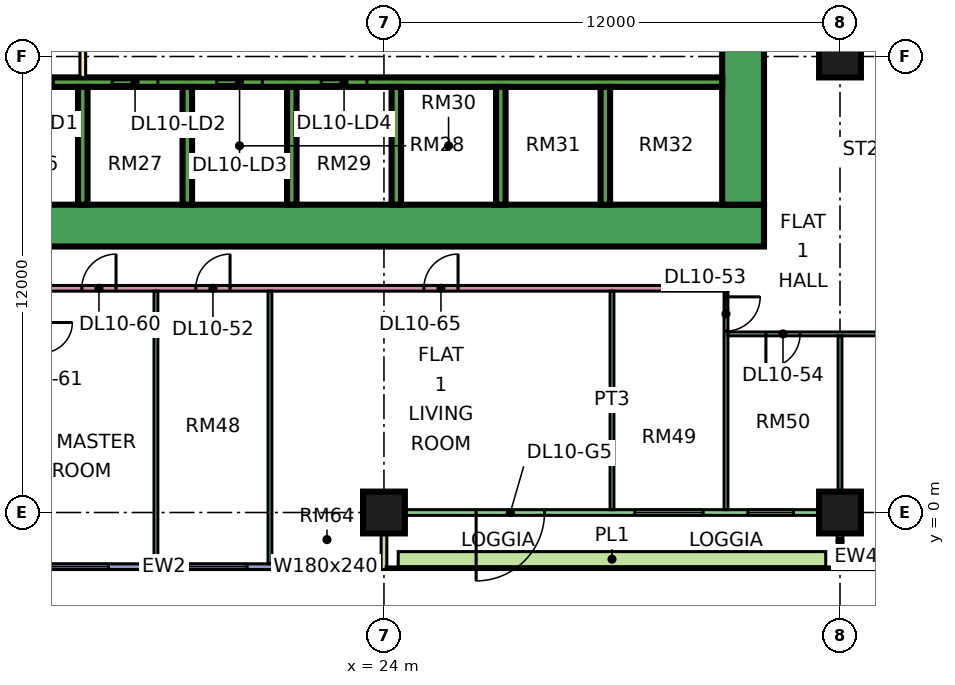
"""IFC4 building model, lengths in metres.
Left out: names, types, materials, properties, quantities, classifications, styles, units other than length and angle.
Written with IfcOpenShell. Run it as: python <this file> out.ifc"""

import sys

from ifc_helpers import new_model, si_unit, direction, frame, frame_2d, origin, origin_2d, place, context, subcontext, project, spatial, rectangle, extrude, element, fill, save


model = new_model("IFC4")
c1 = context("Model", 3, precision=1e-05, world=origin(), true_north=direction((0.0, 1.0)))
c2 = subcontext(c1, "Body", "Model", "MODEL_VIEW")
j1 = project(units=[si_unit("LENGTHUNIT", "METRE"), si_unit("PLANEANGLEUNIT", "RADIAN")], contexts=[c1])
p1 = place(None, origin())
s1 = spatial("IfcSite", under=j1, at=p1, CompositionType="ELEMENT")
p2 = place(p1, origin())
s2 = spatial("IfcBuilding", under=s1, at=p2, CompositionType="ELEMENT")
p3 = place(p2, frame((0.0, 0.0, 52.65)))
s3 = spatial("IfcBuildingStorey", under=s2, at=p3, CompositionType="ELEMENT", Elevation=52.65)
for number, where, z_axis, x_axis in (
    (1, (24.0, 0.0, 0.0), (0.0, 0.0, 1.0), (1.0, 0.0, 0.0)),
    (2, (36.0, 0.0, 0.0), (0.0, 0.0, 1.0), (1.0, 0.0, 0.0)),
    (3, (36.0, 12.0, 0.0), (0.0, 0.0, 1.0), (1.0, 0.0, 0.0)),
):
    element("IfcColumn", number, at=place(p3, frame(where, z_axis=z_axis, x_axis=x_axis)), inside=s3, PredefinedType="COLUMN", context=c2, shape_type="SweptSolid", body=[
        extrude(rectangle(XDim=1.1, YDim=1.1, at=origin_2d()), origin(), (0.0, 0.0, 1.0), 3.75),
    ])
p4 = place(p3, frame((9.0, 7.55, 0.0), z_axis=(0.0, 0.0, 1.0), x_axis=(1.0, 0.0, 0.0)))
e4 = element("IfcWall", 4, at=p4, inside=s3, PredefinedType="SHEAR", context=c2, shape_type="SweptSolid", body=[
    extrude(rectangle(XDim=25.0, YDim=1.1, at=frame_2d((12.5, 0.0))), origin(), (0.0, 0.0, 1.0), 3.75),
])
p5 = place(p3, frame((33.45, 8.1, 0.0), z_axis=(0.0, 0.0, 1.0), x_axis=(0.0, 1.0, 0.0)))
e5 = element("IfcWall", 5, at=p5, inside=s3, PredefinedType="SHEAR", context=c2, shape_type="SweptSolid", body=[
    extrude(rectangle(XDim=10.8, YDim=1.1, at=frame_2d((5.4, 0.0))), origin(), (0.0, 0.0, 1.0), 3.75),
])
p6 = place(p5, frame((5.1, 0.0, 0.0)))
e6 = element("IfcOpeningElement", 6, at=p6, cuts=e5, PredefinedType="OPENING", context=c2, shape_type="SweptSolid", body=[
    extrude(rectangle(XDim=1.8, YDim=2.4, at=frame_2d((0.9, 1.2))), frame((0.0, 0.56, 0.0), z_axis=(0.0, -1.0, 0.0), x_axis=(1.0, 0.0, 0.0)), (0.0, 0.0, 1.0), 1.12),
])
p7 = place(p3, frame((13.45, 11.325, 0.0), z_axis=(0.0, 0.0, 1.0), x_axis=(1.0, 0.0, 0.0)))
e7 = element("IfcWall", 7, at=p7, inside=s3, PredefinedType="SHEAR", context=c2, shape_type="SweptSolid", body=[
    extrude(rectangle(XDim=19.45, YDim=0.25, at=frame_2d((9.725, 0.0))), origin(), (0.0, 0.0, 1.0), 3.75),
])
p8 = place(p7, frame((0.65, 0.0, 0.0)))
e8 = element("IfcOpeningElement", 8, at=p8, cuts=e7, PredefinedType="OPENING", context=c2, shape_type="SweptSolid", body=[
    extrude(rectangle(XDim=1.2, YDim=2.2, at=frame_2d((0.6, 1.1))), frame((0.0, 0.135, 0.0), z_axis=(0.0, -1.0, 0.0), x_axis=(1.0, 0.0, 0.0)), (0.0, 0.0, 1.0), 0.27),
])
p9 = place(p7, frame((3.4, 0.0, 0.0)))
e9 = element("IfcOpeningElement", 9, at=p9, cuts=e7, PredefinedType="OPENING", context=c2, shape_type="SweptSolid", body=[
    extrude(rectangle(XDim=1.2, YDim=2.2, at=frame_2d((0.6, 1.1))), frame((0.0, 0.135, 0.0), z_axis=(0.0, -1.0, 0.0), x_axis=(1.0, 0.0, 0.0)), (0.0, 0.0, 1.0), 0.27),
])
p10 = place(p7, frame((6.15, 0.0, 0.0)))
e10 = element("IfcOpeningElement", 10, at=p10, cuts=e7, PredefinedType="OPENING", context=c2, shape_type="SweptSolid", body=[
    extrude(rectangle(XDim=1.2, YDim=2.2, at=frame_2d((0.6, 1.1))), frame((0.0, 0.135, 0.0), z_axis=(0.0, -1.0, 0.0), x_axis=(1.0, 0.0, 0.0)), (0.0, 0.0, 1.0), 0.27),
])
p11 = place(p7, frame((8.9, 0.0, 0.0)))
e11 = element("IfcOpeningElement", 11, at=p11, cuts=e7, PredefinedType="OPENING", context=c2, shape_type="SweptSolid", body=[
    extrude(rectangle(XDim=1.2, YDim=2.2, at=frame_2d((0.6, 1.1))), frame((0.0, 0.135, 0.0), z_axis=(0.0, -1.0, 0.0), x_axis=(1.0, 0.0, 0.0)), (0.0, 0.0, 1.0), 0.27),
])
for number, where, z_axis, x_axis in (
    (12, (16.075, 8.1, 0.0), (0.0, 0.0, 1.0), (0.0, 1.0, 0.0)),
    (13, (18.825, 8.1, 0.0), (0.0, 0.0, 1.0), (0.0, 1.0, 0.0)),
    (14, (21.575, 8.1, 0.0), (0.0, 0.0, 1.0), (0.0, 1.0, 0.0)),
    (15, (24.325, 8.1, 0.0), (0.0, 0.0, 1.0), (0.0, 1.0, 0.0)),
    (16, (27.075, 8.1, 0.0), (0.0, 0.0, 1.0), (0.0, 1.0, 0.0)),
    (17, (29.825, 8.1, 0.0), (0.0, 0.0, 1.0), (0.0, 1.0, 0.0)),
):
    element("IfcWall", number, at=place(p3, frame(where, z_axis=z_axis, x_axis=x_axis)), inside=s3, PredefinedType="SHEAR", context=c2, shape_type="SweptSolid", body=[
        extrude(rectangle(XDim=3.1, YDim=0.25, at=frame_2d((1.55, 0.0))), origin(), (0.0, 0.0, 1.0), 3.75),
    ])
p12 = place(p3, frame((12.5, -1.425, 0.0), z_axis=(0.0, 0.0, 1.0), x_axis=(1.0, 0.0, 0.0)))
e18 = element("IfcWall", 18, at=p12, inside=s3, PredefinedType="SOLIDWALL", context=c2, shape_type="SweptSolid", body=[
    extrude(rectangle(XDim=11.425, YDim=0.15, at=frame_2d((5.712, 0.0))), origin(), (0.0, 0.0, 1.0), 3.35),
])
p13 = place(p12, frame((1.25, 0.0, 0.45)))
e19 = element("IfcOpeningElement", 19, at=p13, cuts=e18, PredefinedType="OPENING", context=c2, shape_type="SweptSolid", body=[
    extrude(rectangle(XDim=3.0, YDim=2.4, at=frame_2d((1.5, 1.2))), frame((0.0, 0.085, 0.0), z_axis=(0.0, -1.0, 0.0), x_axis=(1.0, 0.0, 0.0)), (0.0, 0.0, 1.0), 0.17),
])
p14 = place(p12, frame((6.1, 0.0, 0.45)))
e20 = element("IfcOpeningElement", 20, at=p14, cuts=e18, PredefinedType="OPENING", context=c2, shape_type="SweptSolid", body=[
    extrude(rectangle(XDim=1.8, YDim=2.4, at=frame_2d((0.9, 1.2))), frame((0.0, 0.085, 0.0), z_axis=(0.0, -1.0, 0.0), x_axis=(1.0, 0.0, 0.0)), (0.0, 0.0, 1.0), 0.17),
])
p15 = place(p12, frame((9.062, 0.0, 0.45)))
e21 = element("IfcOpeningElement", 21, at=p15, cuts=e18, PredefinedType="OPENING", context=c2, shape_type="SweptSolid", body=[
    extrude(rectangle(XDim=1.8, YDim=2.4, at=frame_2d((0.9, 1.2))), frame((0.0, 0.085, 0.0), z_axis=(0.0, -1.0, 0.0), x_axis=(1.0, 0.0, 0.0)), (0.0, 0.0, 1.0), 0.17),
])
p16 = place(p3, frame((24.075, 0.0, 0.0), z_axis=(0.0, 0.0, 1.0), x_axis=(1.0, 0.0, 0.0)))
e22 = element("IfcWall", 22, at=p16, inside=s3, PredefinedType="SOLIDWALL", context=c2, shape_type="SweptSolid", body=[
    extrude(rectangle(XDim=11.85, YDim=0.15, at=frame_2d((5.925, 0.0))), origin(), (0.0, 0.0, 1.0), 3.35),
])
p17 = place(p16, frame((2.35, 0.0, 0.0)))
e23 = element("IfcOpeningElement", 23, at=p17, cuts=e22, PredefinedType="OPENING", context=c2, shape_type="SweptSolid", body=[
    extrude(rectangle(XDim=1.8, YDim=2.4, at=frame_2d((0.9, 1.2))), frame((0.0, 0.085, 0.0), z_axis=(0.0, -1.0, 0.0), x_axis=(1.0, 0.0, 0.0)), (0.0, 0.0, 1.0), 0.17),
])
p18 = place(p16, frame((6.525, 0.0, 0.45)))
e24 = element("IfcOpeningElement", 24, at=p18, cuts=e22, PredefinedType="OPENING", context=c2, shape_type="SweptSolid", body=[
    extrude(rectangle(XDim=1.8, YDim=2.4, at=frame_2d((0.9, 1.2))), frame((0.0, 0.085, 0.0), z_axis=(0.0, -1.0, 0.0), x_axis=(1.0, 0.0, 0.0)), (0.0, 0.0, 1.0), 0.17),
])
p19 = place(p16, frame((9.5, 0.0, 0.45)))
e25 = element("IfcOpeningElement", 25, at=p19, cuts=e22, PredefinedType="OPENING", context=c2, shape_type="SweptSolid", body=[
    extrude(rectangle(XDim=1.2, YDim=2.4, at=frame_2d((0.6, 1.2))), frame((0.0, 0.085, 0.0), z_axis=(0.0, -1.0, 0.0), x_axis=(1.0, 0.0, 0.0)), (0.0, 0.0, 1.0), 0.17),
])
for number, where, z_axis, x_axis in (
    (26, (24.0, -1.5, 0.0), (0.0, 0.0, 1.0), (0.0, 1.0, 0.0)),
    (27, (36.0, -1.5, 0.0), (0.0, 0.0, 1.0), (0.0, 1.0, 0.0)),
):
    element("IfcWall", number, at=place(p3, frame(where, z_axis=z_axis, x_axis=x_axis)), inside=s3, PredefinedType="SOLIDWALL", context=c2, shape_type="SweptSolid", body=[
        extrude(rectangle(XDim=1.5, YDim=0.15, at=frame_2d((0.75, 0.0))), origin(), (0.0, 0.0, 1.0), 3.35),
    ])
p20 = place(p3, frame((36.075, -1.425, 0.0), z_axis=(0.0, 0.0, 1.0), x_axis=(1.0, 0.0, 0.0)))
e28 = element("IfcWall", 28, at=p20, inside=s3, PredefinedType="SOLIDWALL", context=c2, shape_type="SweptSolid", body=[
    extrude(rectangle(XDim=11.85, YDim=0.15, at=frame_2d((5.925, 0.0))), origin(), (0.0, 0.0, 1.0), 3.35),
])
p21 = place(p20, frame((2.962, 0.0, 0.45)))
e29 = element("IfcOpeningElement", 29, at=p21, cuts=e28, PredefinedType="OPENING", context=c2, shape_type="SweptSolid", body=[
    extrude(rectangle(XDim=3.0, YDim=2.4, at=frame_2d((1.5, 1.2))), frame((0.0, 0.085, 0.0), z_axis=(0.0, -1.0, 0.0), x_axis=(1.0, 0.0, 0.0)), (0.0, 0.0, 1.0), 0.17),
])
p22 = place(p20, frame((9.488, 0.0, 0.45)))
e30 = element("IfcOpeningElement", 30, at=p22, cuts=e28, PredefinedType="OPENING", context=c2, shape_type="SweptSolid", body=[
    extrude(rectangle(XDim=1.8, YDim=2.4, at=frame_2d((0.9, 1.2))), frame((0.0, 0.085, 0.0), z_axis=(0.0, -1.0, 0.0), x_axis=(1.0, 0.0, 0.0)), (0.0, 0.0, 1.0), 0.17),
])
p23 = place(p3, frame((24.375, -1.229, 0.0), z_axis=(0.0, 0.0, 1.0), x_axis=(1.0, 0.0, 0.0)))
e31 = element("IfcWall", 31, at=p23, inside=s3, PredefinedType="SOLIDWALL", context=c2, shape_type="SweptSolid", body=[
    extrude(rectangle(XDim=11.25, YDim=0.4, at=frame_2d((5.625, 0.0))), origin(), (0.0, 0.0, 1.0), 0.7),
])
p24 = place(p3, frame((16.075, 11.45, 0.0), z_axis=(0.0, 0.0, 1.0), x_axis=(0.0, 1.0, 0.0)))
e32 = element("IfcWall", 32, at=p24, inside=s3, PredefinedType="PARTITIONING", context=c2, shape_type="SweptSolid", body=[
    extrude(rectangle(XDim=4.1, YDim=0.15, at=frame_2d((2.05, 0.0))), origin(), (0.0, 0.0, 1.0), 3.35),
])
p25 = place(p24, frame((1.15, 0.0, 0.0)))
e33 = element("IfcOpeningElement", 33, at=p25, cuts=e32, PredefinedType="OPENING", context=c2, shape_type="SweptSolid", body=[
    extrude(rectangle(XDim=1.8, YDim=2.4, at=frame_2d((0.9, 1.2))), frame((0.0, 0.085, 0.0), z_axis=(0.0, -1.0, 0.0), x_axis=(1.0, 0.0, 0.0)), (0.0, 0.0, 1.0), 0.17),
])
p26 = place(p3, frame((11.925, 5.9, 0.0), z_axis=(0.0, 0.0, 1.0), x_axis=(1.0, 0.0, 0.0)))
e34 = element("IfcWall", 34, at=p26, inside=s3, PredefinedType="PARTITIONING", context=c2, shape_type="SweptSolid", body=[
    extrude(rectangle(XDim=21.125, YDim=0.15, at=frame_2d((10.562, 0.0))), origin(), (0.0, 0.0, 1.0), 3.35),
])
p27 = place(p26, frame((7.125, 0.0, 0.0)))
e35 = element("IfcOpeningElement", 35, at=p27, cuts=e34, PredefinedType="OPENING", context=c2, shape_type="SweptSolid", body=[
    extrude(rectangle(XDim=0.9, YDim=2.1, at=frame_2d((0.45, 1.05))), frame((0.0, 0.085, 0.0), z_axis=(0.0, -1.0, 0.0), x_axis=(1.0, 0.0, 0.0)), (0.0, 0.0, 1.0), 0.17),
])
p28 = place(p26, frame((4.125, 0.0, 0.0)))
e36 = element("IfcOpeningElement", 36, at=p28, cuts=e34, PredefinedType="OPENING", context=c2, shape_type="SweptSolid", body=[
    extrude(rectangle(XDim=0.9, YDim=2.1, at=frame_2d((0.45, 1.05))), frame((0.0, 0.085, 0.0), z_axis=(0.0, -1.0, 0.0), x_axis=(1.0, 0.0, 0.0)), (0.0, 0.0, 1.0), 0.17),
])
p29 = place(p26, frame((13.125, 0.0, 0.0)))
e37 = element("IfcOpeningElement", 37, at=p29, cuts=e34, PredefinedType="OPENING", context=c2, shape_type="SweptSolid", body=[
    extrude(rectangle(XDim=0.9, YDim=2.1, at=frame_2d((0.45, 1.05))), frame((0.0, 0.085, 0.0), z_axis=(0.0, -1.0, 0.0), x_axis=(1.0, 0.0, 0.0)), (0.0, 0.0, 1.0), 0.17),
])
p30 = place(p3, frame((18.0, -1.351, 0.0), z_axis=(0.0, 0.0, 1.0), x_axis=(0.0, 1.0, 0.0)))
e38 = element("IfcWall", 38, at=p30, inside=s3, PredefinedType="PARTITIONING", context=c2, shape_type="SweptSolid", body=[
    extrude(rectangle(XDim=7.176, YDim=0.1, at=frame_2d((3.588, 0.0))), origin(), (0.0, 0.0, 1.0), 3.35),
])
p31 = place(p3, frame((21.0, -1.35, 0.0), z_axis=(0.0, 0.0, 1.0), x_axis=(0.0, 1.0, 0.0)))
e39 = element("IfcWall", 39, at=p31, inside=s3, PredefinedType="PARTITIONING", context=c2, shape_type="SweptSolid", body=[
    extrude(rectangle(XDim=7.175, YDim=0.1, at=frame_2d((3.587, 0.0))), origin(), (0.0, 0.0, 1.0), 3.35),
])
p32 = place(p3, frame((30.0, 0.074, 0.0), z_axis=(0.0, 0.0, 1.0), x_axis=(0.0, 1.0, 0.0)))
e40 = element("IfcWall", 40, at=p32, inside=s3, PredefinedType="PARTITIONING", context=c2, shape_type="SweptSolid", body=[
    extrude(rectangle(XDim=5.751, YDim=0.1, at=frame_2d((2.875, 0.0))), origin(), (0.0, 0.0, 1.0), 3.35),
])
p33 = place(p3, frame((33.0, 0.074, 0.0), z_axis=(0.0, 0.0, 1.0), x_axis=(0.0, 1.0, 0.0)))
e41 = element("IfcWall", 41, at=p33, inside=s3, PredefinedType="PARTITIONING", context=c2, shape_type="SweptSolid", body=[
    extrude(rectangle(XDim=5.751, YDim=0.1, at=frame_2d((2.875, 0.0))), origin(), (0.0, 0.0, 1.0), 3.35),
])
p34 = place(p33, frame((4.701, 0.0, 0.0)))
e42 = element("IfcOpeningElement", 42, at=p34, cuts=e41, PredefinedType="OPENING", context=c2, shape_type="SweptSolid", body=[
    extrude(rectangle(XDim=0.9, YDim=2.1, at=frame_2d((0.45, 1.05))), frame((0.0, 0.06, 0.0), z_axis=(0.0, -1.0, 0.0), x_axis=(1.0, 0.0, 0.0)), (0.0, 0.0, 1.0), 0.12),
])
p35 = place(p3, frame((33.05, 4.7, 0.0), z_axis=(0.0, 0.0, 1.0), x_axis=(1.0, 0.0, 0.0)))
e43 = element("IfcWall", 43, at=p35, inside=s3, PredefinedType="PARTITIONING", context=c2, shape_type="SweptSolid", body=[
    extrude(rectangle(XDim=20.85, YDim=0.1, at=frame_2d((10.425, 0.0))), origin(), (0.0, 0.0, 1.0), 3.35),
])
p36 = place(p35, frame((1.0, 0.0, 0.0)))
e44 = element("IfcOpeningElement", 44, at=p36, cuts=e43, PredefinedType="OPENING", context=c2, shape_type="SweptSolid", body=[
    extrude(rectangle(XDim=0.9, YDim=2.1, at=frame_2d((0.45, 1.05))), frame((0.0, 0.06, 0.0), z_axis=(0.0, -1.0, 0.0), x_axis=(1.0, 0.0, 0.0)), (0.0, 0.0, 1.0), 0.12),
])
p37 = place(p35, frame((13.0, 0.0, 0.0)))
e45 = element("IfcOpeningElement", 45, at=p37, cuts=e43, PredefinedType="OPENING", context=c2, shape_type="SweptSolid", body=[
    extrude(rectangle(XDim=0.9, YDim=2.1, at=frame_2d((0.45, 1.05))), frame((0.0, 0.06, 0.0), z_axis=(0.0, -1.0, 0.0), x_axis=(1.0, 0.0, 0.0)), (0.0, 0.0, 1.0), 0.12),
])
p38 = place(p35, frame((16.0, 0.0, 0.0)))
e46 = element("IfcOpeningElement", 46, at=p38, cuts=e43, PredefinedType="OPENING", context=c2, shape_type="SweptSolid", body=[
    extrude(rectangle(XDim=0.9, YDim=2.1, at=frame_2d((0.45, 1.05))), frame((0.0, 0.06, 0.0), z_axis=(0.0, -1.0, 0.0), x_axis=(1.0, 0.0, 0.0)), (0.0, 0.0, 1.0), 0.12),
])
p39 = place(p35, frame((19.0, 0.0, 0.0)))
e47 = element("IfcOpeningElement", 47, at=p39, cuts=e43, PredefinedType="OPENING", context=c2, shape_type="SweptSolid", body=[
    extrude(rectangle(XDim=0.9, YDim=2.1, at=frame_2d((0.45, 1.05))), frame((0.0, 0.06, 0.0), z_axis=(0.0, -1.0, 0.0), x_axis=(1.0, 0.0, 0.0)), (0.0, 0.0, 1.0), 0.12),
])
p40 = place(p35, frame((7.0, 0.0, 0.0)))
e48 = element("IfcOpeningElement", 48, at=p40, cuts=e43, PredefinedType="OPENING", context=c2, shape_type="SweptSolid", body=[
    extrude(rectangle(XDim=0.9, YDim=2.1, at=frame_2d((0.45, 1.05))), frame((0.0, 0.06, 0.0), z_axis=(0.0, -1.0, 0.0), x_axis=(1.0, 0.0, 0.0)), (0.0, 0.0, 1.0), 0.12),
])
p41 = place(p3, frame((36.0, 0.0, 0.0), z_axis=(0.0, 0.0, 1.0), x_axis=(0.0, 1.0, 0.0)))
e49 = element("IfcWall", 49, at=p41, inside=s3, PredefinedType="PARTITIONING", context=c2, shape_type="SweptSolid", body=[
    extrude(rectangle(XDim=4.65, YDim=0.1, at=frame_2d((2.325, 0.0))), origin(), (0.0, 0.0, 1.0), 3.35),
])
p42 = place(p13, origin())
e50 = element("IfcWindow", 50, at=p42, inside=s3, PartitioningType="SINGLE_PANEL", PredefinedType="WINDOW", context=c2, shape_type="SweptSolid", body=[
    extrude(rectangle(XDim=3.0, YDim=2.4, at=frame_2d((1.5, 1.2))), frame((0.0, 0.03, 0.0), z_axis=(0.0, -1.0, 0.0), x_axis=(1.0, 0.0, 0.0)), (0.0, 0.0, 1.0), 0.06),
])
fill(e19, e50)
p43 = place(p14, origin())
e51 = element("IfcWindow", 51, at=p43, inside=s3, PartitioningType="SINGLE_PANEL", PredefinedType="WINDOW", context=c2, shape_type="SweptSolid", body=[
    extrude(rectangle(XDim=1.8, YDim=2.4, at=frame_2d((0.9, 1.2))), frame((0.0, 0.03, 0.0), z_axis=(0.0, -1.0, 0.0), x_axis=(1.0, 0.0, 0.0)), (0.0, 0.0, 1.0), 0.06),
])
fill(e20, e51)
p44 = place(p15, origin())
e52 = element("IfcWindow", 52, at=p44, inside=s3, PartitioningType="SINGLE_PANEL", PredefinedType="WINDOW", context=c2, shape_type="SweptSolid", body=[
    extrude(rectangle(XDim=1.8, YDim=2.4, at=frame_2d((0.9, 1.2))), frame((0.0, 0.03, 0.0), z_axis=(0.0, -1.0, 0.0), x_axis=(1.0, 0.0, 0.0)), (0.0, 0.0, 1.0), 0.06),
])
fill(e21, e52)
p45 = place(p17, frame((1.8, 0.0, 0.0), z_axis=(0.0, 0.0, 1.0), x_axis=(-1.0, 0.0, 0.0)))
e53 = element("IfcDoor", 53, at=p45, inside=s3, OperationType="DOUBLE_DOOR_SINGLE_SWING", PredefinedType="DOOR", context=c2, shape_type="SweptSolid", body=[
    extrude(rectangle(XDim=1.8, YDim=2.4, at=frame_2d((0.9, 1.2))), frame((0.0, 0.025, 0.0), z_axis=(0.0, -1.0, 0.0), x_axis=(1.0, 0.0, 0.0)), (0.0, 0.0, 1.0), 0.05),
])
fill(e23, e53)
p46 = place(p18, origin())
e54 = element("IfcWindow", 54, at=p46, inside=s3, PartitioningType="SINGLE_PANEL", PredefinedType="WINDOW", context=c2, shape_type="SweptSolid", body=[
    extrude(rectangle(XDim=1.8, YDim=2.4, at=frame_2d((0.9, 1.2))), frame((0.0, 0.03, 0.0), z_axis=(0.0, -1.0, 0.0), x_axis=(1.0, 0.0, 0.0)), (0.0, 0.0, 1.0), 0.06),
])
fill(e24, e54)
p47 = place(p19, origin())
e55 = element("IfcWindow", 55, at=p47, inside=s3, PartitioningType="SINGLE_PANEL", PredefinedType="WINDOW", context=c2, shape_type="SweptSolid", body=[
    extrude(rectangle(XDim=1.2, YDim=2.4, at=frame_2d((0.6, 1.2))), frame((0.0, 0.03, 0.0), z_axis=(0.0, -1.0, 0.0), x_axis=(1.0, 0.0, 0.0)), (0.0, 0.0, 1.0), 0.06),
])
fill(e25, e55)
p48 = place(p8, origin())
e56 = element("IfcDoor", 56, at=p48, inside=s3, OperationType="DOUBLE_DOOR_SLIDING", PredefinedType="DOOR", context=c2, shape_type="SweptSolid", body=[
    extrude(rectangle(XDim=1.2, YDim=2.2, at=frame_2d((0.6, 1.1))), frame((0.0, 0.025, 0.0), z_axis=(0.0, -1.0, 0.0), x_axis=(1.0, 0.0, 0.0)), (0.0, 0.0, 1.0), 0.05),
])
fill(e8, e56)
p49 = place(p9, origin())
e57 = element("IfcDoor", 57, at=p49, inside=s3, OperationType="DOUBLE_DOOR_SLIDING", PredefinedType="DOOR", context=c2, shape_type="SweptSolid", body=[
    extrude(rectangle(XDim=1.2, YDim=2.2, at=frame_2d((0.6, 1.1))), frame((0.0, 0.025, 0.0), z_axis=(0.0, -1.0, 0.0), x_axis=(1.0, 0.0, 0.0)), (0.0, 0.0, 1.0), 0.05),
])
fill(e9, e57)
p50 = place(p10, origin())
e58 = element("IfcDoor", 58, at=p50, inside=s3, OperationType="DOUBLE_DOOR_SLIDING", PredefinedType="DOOR", context=c2, shape_type="SweptSolid", body=[
    extrude(rectangle(XDim=1.2, YDim=2.2, at=frame_2d((0.6, 1.1))), frame((0.0, 0.025, 0.0), z_axis=(0.0, -1.0, 0.0), x_axis=(1.0, 0.0, 0.0)), (0.0, 0.0, 1.0), 0.05),
])
fill(e10, e58)
p51 = place(p11, origin())
e59 = element("IfcDoor", 59, at=p51, inside=s3, OperationType="DOUBLE_DOOR_SLIDING", PredefinedType="DOOR", context=c2, shape_type="SweptSolid", body=[
    extrude(rectangle(XDim=1.2, YDim=2.2, at=frame_2d((0.6, 1.1))), frame((0.0, 0.025, 0.0), z_axis=(0.0, -1.0, 0.0), x_axis=(1.0, 0.0, 0.0)), (0.0, 0.0, 1.0), 0.05),
])
fill(e11, e59)
p52 = place(p27, frame((0.9, 0.0, 0.0), z_axis=(0.0, 0.0, 1.0), x_axis=(-1.0, 0.0, 0.0)))
e60 = element("IfcDoor", 60, at=p52, inside=s3, OperationType="SINGLE_SWING_RIGHT", PredefinedType="DOOR", context=c2, shape_type="SweptSolid", body=[
    extrude(rectangle(XDim=0.9, YDim=2.1, at=frame_2d((0.45, 1.05))), frame((0.0, 0.025, 0.0), z_axis=(0.0, -1.0, 0.0), x_axis=(1.0, 0.0, 0.0)), (0.0, 0.0, 1.0), 0.05),
])
fill(e35, e60)
p53 = place(p34, origin())
e61 = element("IfcDoor", 61, at=p53, inside=s3, OperationType="SINGLE_SWING_RIGHT", PredefinedType="DOOR", context=c2, shape_type="SweptSolid", body=[
    extrude(rectangle(XDim=0.9, YDim=2.1, at=frame_2d((0.45, 1.05))), frame((0.0, 0.025, 0.0), z_axis=(0.0, -1.0, 0.0), x_axis=(1.0, 0.0, 0.0)), (0.0, 0.0, 1.0), 0.05),
])
fill(e42, e61)
p54 = place(p36, frame((0.9, 0.0, 0.0), z_axis=(0.0, 0.0, 1.0), x_axis=(-1.0, 0.0, 0.0)))
e62 = element("IfcDoor", 62, at=p54, inside=s3, OperationType="SINGLE_SWING_LEFT", PredefinedType="DOOR", context=c2, shape_type="SweptSolid", body=[
    extrude(rectangle(XDim=0.9, YDim=2.1, at=frame_2d((0.45, 1.05))), frame((0.0, 0.025, 0.0), z_axis=(0.0, -1.0, 0.0), x_axis=(1.0, 0.0, 0.0)), (0.0, 0.0, 1.0), 0.05),
])
fill(e44, e62)
p55 = place(p28, frame((0.9, 0.0, 0.0), z_axis=(0.0, 0.0, 1.0), x_axis=(-1.0, 0.0, 0.0)))
e63 = element("IfcDoor", 63, at=p55, inside=s3, OperationType="SINGLE_SWING_RIGHT", PredefinedType="DOOR", context=c2, shape_type="SweptSolid", body=[
    extrude(rectangle(XDim=0.9, YDim=2.1, at=frame_2d((0.45, 1.05))), frame((0.0, 0.025, 0.0), z_axis=(0.0, -1.0, 0.0), x_axis=(1.0, 0.0, 0.0)), (0.0, 0.0, 1.0), 0.05),
])
fill(e36, e63)
p56 = place(p29, frame((0.9, 0.0, 0.0), z_axis=(0.0, 0.0, 1.0), x_axis=(-1.0, 0.0, 0.0)))
e64 = element("IfcDoor", 64, at=p56, inside=s3, OperationType="SINGLE_SWING_RIGHT", PredefinedType="DOOR", context=c2, shape_type="SweptSolid", body=[
    extrude(rectangle(XDim=0.9, YDim=2.1, at=frame_2d((0.45, 1.05))), frame((0.0, 0.025, 0.0), z_axis=(0.0, -1.0, 0.0), x_axis=(1.0, 0.0, 0.0)), (0.0, 0.0, 1.0), 0.05),
])
fill(e37, e64)
save(model, sys.argv[1])
